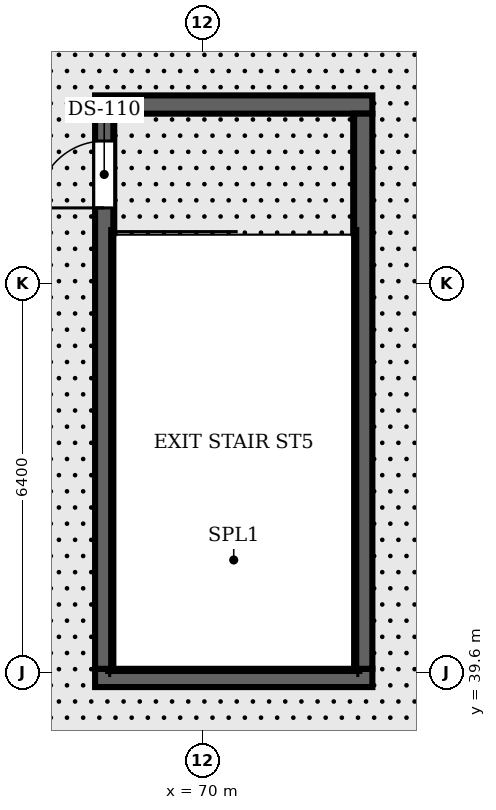
"""IFC4 building model, lengths in metres.
Left out: names, types, materials, properties, quantities, classifications, styles, units other than length and angle.
Written with IfcOpenShell. Run it as: python <this file> out.ifc"""

import sys

from ifc_helpers import new_model, si_unit, direction, frame, frame_2d, origin, place, context, subcontext, project, spatial, rectangle, extrude, element, fill, save


model = new_model("IFC4")
c1 = context("Model", 3, precision=1e-05, world=origin(), true_north=direction((0.0, 1.0)))
c2 = subcontext(c1, "Body", "Model", "MODEL_VIEW")
j1 = project(units=[si_unit("LENGTHUNIT", "METRE"), si_unit("PLANEANGLEUNIT", "RADIAN")], contexts=[c1])
p1 = place(None, origin())
s1 = spatial("IfcSite", under=j1, at=p1, CompositionType="ELEMENT")
p2 = place(p1, origin())
s2 = spatial("IfcBuilding", under=s1, at=p2, CompositionType="ELEMENT")
p3 = place(p2, frame((0.0, 0.0, 35.4)))
s3 = spatial("IfcBuildingStorey", under=s2, at=p3, CompositionType="ELEMENT", Elevation=35.4)
for number, where, z_axis, x_axis in (
    (1, (68.23, 39.51, 0.0), (0.0, 0.0, 1.0), (1.0, 0.0, 0.0)),
    (2, (68.23, 48.94, 0.0), (0.0, 0.0, 1.0), (1.0, 0.0, 0.0)),
):
    element("IfcWall", number, at=place(p3, frame(where, z_axis=z_axis, x_axis=x_axis)), inside=s3, PredefinedType="SHEAR", context=c2, shape_type="SweptSolid", body=[
        extrude(rectangle(XDim=4.56, YDim=0.3, at=frame_2d((2.28, 0.0))), origin(), (0.0, 0.0, 1.0), 4.8),
    ])
p4 = place(p3, frame((68.38, 39.66, 0.0), z_axis=(0.0, 0.0, 1.0), x_axis=(0.0, 1.0, 0.0)))
e3 = element("IfcWall", 3, at=p4, inside=s3, PredefinedType="SHEAR", context=c2, shape_type="SweptSolid", body=[
    extrude(rectangle(XDim=9.13, YDim=0.3, at=frame_2d((4.565, 0.0))), origin(), (0.0, 0.0, 1.0), 4.8),
])
p5 = place(p4, frame((7.58, 0.0, 0.0)))
e4 = element("IfcOpeningElement", 4, at=p5, cuts=e3, PredefinedType="OPENING", context=c2, shape_type="SweptSolid", body=[
    extrude(rectangle(XDim=1.1, YDim=2.15, at=frame_2d((0.55, 1.075))), frame((0.0, 0.16, 0.0), z_axis=(0.0, -1.0, 0.0), x_axis=(1.0, 0.0, 0.0)), (0.0, 0.0, 1.0), 0.32),
])
p6 = place(p3, frame((72.64, 48.79, 0.0), z_axis=(0.0, 0.0, 1.0), x_axis=(0.0, -1.0, 0.0)))
e5 = element("IfcWall", 5, at=p6, inside=s3, PredefinedType="SHEAR", context=c2, shape_type="SweptSolid", body=[
    extrude(rectangle(XDim=9.13, YDim=0.3, at=frame_2d((4.565, 0.0))), origin(), (0.0, 0.0, 1.0), 4.8),
])
p7 = place(p5, origin())
e6 = element("IfcDoor", 6, at=p7, inside=s3, OperationType="SINGLE_SWING_LEFT", PredefinedType="DOOR", context=c2, shape_type="SweptSolid", body=[
    extrude(rectangle(XDim=1.1, YDim=2.15, at=frame_2d((0.55, 1.075))), frame((0.0, 0.025, 0.0), z_axis=(0.0, -1.0, 0.0), x_axis=(1.0, 0.0, 0.0)), (0.0, 0.0, 1.0), 0.05),
])
fill(e4, e6)
save(model, sys.argv[1])
